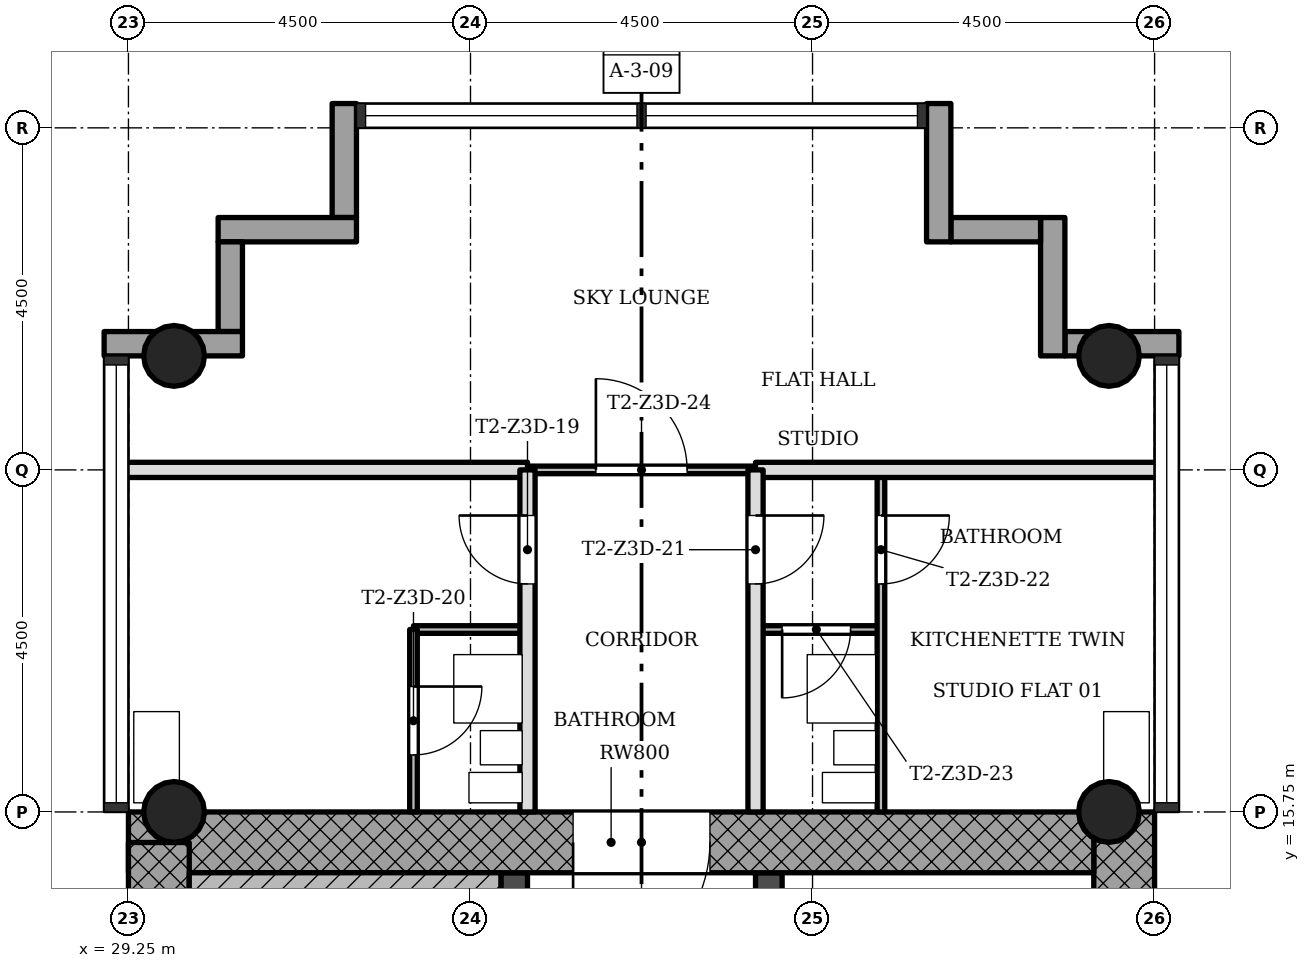
"""IFC4 building model, lengths in metres.
Left out: names, types, materials, properties, quantities, classifications, styles, units other than length and angle.
Written with IfcOpenShell. Run it as: python <this file> out.ifc"""

import sys

from ifc_helpers import new_model, si_unit, direction, frame, frame_2d, origin, origin_2d, place, context, subcontext, project, spatial, rectangle, hollow_circle, extrude, element, fill, save


model = new_model("IFC4")
c1 = context("Model", 3, precision=1e-05, world=origin(), true_north=direction((0.0, 1.0)))
c2 = subcontext(c1, "Body", "Model", "MODEL_VIEW")
j1 = project(units=[si_unit("LENGTHUNIT", "METRE"), si_unit("PLANEANGLEUNIT", "RADIAN")], contexts=[c1])
p1 = place(None, origin())
s1 = spatial("IfcSite", under=j1, at=p1, CompositionType="ELEMENT")
p2 = place(p1, origin())
s2 = spatial("IfcBuilding", under=s1, at=p2, CompositionType="ELEMENT")
p3 = place(p2, frame((0.0, 0.0, 174.5)))
s3 = spatial("IfcBuildingStorey", under=s2, at=p3, CompositionType="ELEMENT", Elevation=174.5)
p4 = place(p3, frame((42.35, 7.55, 0.0), z_axis=(0.0, 0.0, 1.0), x_axis=(0.0, 1.0, 0.0)))
e1 = element("IfcWall", 1, at=p4, inside=s3, PredefinedType="SHEAR", context=c2, shape_type="SweptSolid", body=[
    extrude(rectangle(XDim=8.2, YDim=0.8, at=frame_2d((4.1, 0.0))), origin(), (0.0, 0.0, 1.0), 3.4),
])
p5 = place(p3, frame((41.95, 15.35, 0.0), z_axis=(0.0, 0.0, 1.0), x_axis=(-1.0, 0.0, 0.0)))
e2 = element("IfcWall", 2, at=p5, inside=s3, PredefinedType="SHEAR", context=c2, shape_type="SweptSolid", body=[
    extrude(rectangle(XDim=12.7, YDim=0.8, at=frame_2d((6.35, 0.0))), origin(), (0.0, 0.0, 1.0), 3.4),
])
p6 = place(p5, frame((5.05, 0.0, 0.0)))
e3 = element("IfcOpeningElement", 3, at=p6, cuts=e2, PredefinedType="OPENING", context=c2, shape_type="SweptSolid", body=[
    extrude(rectangle(XDim=1.8, YDim=2.1, at=frame_2d((0.9, 1.05))), frame((0.0, 0.41, 0.0), z_axis=(0.0, -1.0, 0.0), x_axis=(1.0, 0.0, 0.0)), (0.0, 0.0, 1.0), 0.82),
])
p7 = place(p3, frame((29.65, 15.348, 0.0), z_axis=(0.0, 0.0, 1.0), x_axis=(0.0, -1.0, 0.0)))
e4 = element("IfcWall", 4, at=p7, inside=s3, PredefinedType="SHEAR", context=c2, shape_type="SweptSolid", body=[
    extrude(rectangle(XDim=8.796, YDim=0.8, at=frame_2d((4.398, 0.0))), origin(), (0.0, 0.0, 1.0), 3.4),
])
p8 = place(p3, frame((34.325, 7.55, 0.0), z_axis=(0.0, 0.0, 1.0), x_axis=(0.0, 1.0, 0.0)))
e5 = element("IfcWall", 5, at=p8, inside=s3, PredefinedType="SHEAR", context=c2, shape_type="SweptSolid", body=[
    extrude(rectangle(XDim=7.4, YDim=0.35, at=frame_2d((3.7, 0.0))), origin(), (0.0, 0.0, 1.0), 3.4),
])
p9 = place(p8, frame((0.85, 0.0, 0.0)))
e6 = element("IfcOpeningElement", 6, at=p9, cuts=e5, PredefinedType="OPENING", context=c2, shape_type="SweptSolid", body=[
    extrude(rectangle(XDim=0.9, YDim=2.1, at=frame_2d((0.45, 1.05))), frame((0.0, 0.185, 0.0), z_axis=(0.0, -1.0, 0.0), x_axis=(1.0, 0.0, 0.0)), (0.0, 0.0, 1.0), 0.37),
])
p10 = place(p3, frame((37.675, 7.55, 0.0), z_axis=(0.0, 0.0, 1.0), x_axis=(0.0, 1.0, 0.0)))
e7 = element("IfcWall", 7, at=p10, inside=s3, PredefinedType="SHEAR", context=c2, shape_type="SweptSolid", body=[
    extrude(rectangle(XDim=7.4, YDim=0.35, at=frame_2d((3.7, 0.0))), origin(), (0.0, 0.0, 1.0), 3.4),
])
p11 = place(p10, frame((0.95, 0.0, 0.0)))
e8 = element("IfcOpeningElement", 8, at=p11, cuts=e7, PredefinedType="OPENING", context=c2, shape_type="SweptSolid", body=[
    extrude(rectangle(XDim=1.1, YDim=2.1, at=frame_2d((0.55, 1.05))), frame((0.0, 0.185, 0.0), z_axis=(0.0, -1.0, 0.0), x_axis=(1.0, 0.0, 0.0)), (0.0, 0.0, 1.0), 0.37),
])
p12 = place(p10, frame((3.15, 0.0, 0.0)))
e9 = element("IfcOpeningElement", 9, at=p12, cuts=e7, PredefinedType="OPENING", context=c2, shape_type="SweptSolid", body=[
    extrude(rectangle(XDim=1.1, YDim=2.1, at=frame_2d((0.55, 1.05))), frame((0.0, 0.185, 0.0), z_axis=(0.0, -1.0, 0.0), x_axis=(1.0, 0.0, 0.0)), (0.0, 0.0, 1.0), 0.37),
])
p13 = place(p10, frame((5.35, 0.0, 0.0)))
e10 = element("IfcOpeningElement", 10, at=p13, cuts=e7, PredefinedType="OPENING", context=c2, shape_type="SweptSolid", body=[
    extrude(rectangle(XDim=1.1, YDim=2.1, at=frame_2d((0.55, 1.05))), frame((0.0, 0.185, 0.0), z_axis=(0.0, -1.0, 0.0), x_axis=(1.0, 0.0, 0.0)), (0.0, 0.0, 1.0), 0.37),
])
for number, where, z_axis, x_axis in (
    (11, (42.15, 15.75, 0.0), (0.0, 0.0, 1.0), (1.0, 0.0, 0.0)),
    (12, (29.85, 15.75, 0.0), (0.0, 0.0, 1.0), (1.0, 0.0, 0.0)),
    (13, (42.15, 21.75, 0.0), (0.0, 0.0, 1.0), (1.0, 0.0, 0.0)),
    (14, (29.85, 21.75, 0.0), (0.0, 0.0, 1.0), (1.0, 0.0, 0.0)),
):
    element("IfcColumn", number, at=place(p3, frame(where, z_axis=z_axis, x_axis=x_axis)), inside=s3, PredefinedType="COLUMN", context=c2, shape_type="SweptSolid", body=[
        extrude(hollow_circle(Radius=0.4, WallThickness=0.028, at=origin_2d()), origin(), (0.0, 0.0, 1.0), 3.4),
    ])
p14 = place(p3, frame((43.07, 21.91, -0.3), z_axis=(0.0, 0.0, 1.0), x_axis=(-1.0, 0.0, 0.0)))
e15 = element("IfcWall", 15, at=p14, inside=s3, PredefinedType="STANDARD", context=c2, shape_type="SweptSolid", body=[
    extrude(rectangle(XDim=1.5, YDim=0.32, at=frame_2d((0.75, 0.0))), origin(), (0.0, 0.0, 1.0), 3.4),
])
p15 = place(p3, frame((41.41, 21.75, -0.3), z_axis=(0.0, 0.0, 1.0), x_axis=(0.0, 1.0, 0.0)))
e16 = element("IfcWall", 16, at=p15, inside=s3, PredefinedType="STANDARD", context=c2, shape_type="SweptSolid", body=[
    extrude(rectangle(XDim=1.82, YDim=0.32, at=frame_2d((0.91, 0.0))), origin(), (0.0, 0.0, 1.0), 3.4),
])
p16 = place(p3, frame((41.25, 23.41, -0.3), z_axis=(0.0, 0.0, 1.0), x_axis=(-1.0, 0.0, 0.0)))
e17 = element("IfcWall", 17, at=p16, inside=s3, PredefinedType="STANDARD", context=c2, shape_type="SweptSolid", body=[
    extrude(rectangle(XDim=1.18, YDim=0.32, at=frame_2d((0.59, 0.0))), origin(), (0.0, 0.0, 1.0), 3.4),
])
p17 = place(p3, frame((39.91, 23.25, -0.3), z_axis=(0.0, 0.0, 1.0), x_axis=(0.0, 1.0, 0.0)))
e18 = element("IfcWall", 18, at=p17, inside=s3, PredefinedType="STANDARD", context=c2, shape_type="SweptSolid", body=[
    extrude(rectangle(XDim=1.82, YDim=0.32, at=frame_2d((0.91, 0.0))), origin(), (0.0, 0.0, 1.0), 3.4),
])
p18 = place(p3, frame((32.09, 25.07, -0.3), z_axis=(0.0, 0.0, 1.0), x_axis=(0.0, -1.0, 0.0)))
e19 = element("IfcWall", 19, at=p18, inside=s3, PredefinedType="STANDARD", context=c2, shape_type="SweptSolid", body=[
    extrude(rectangle(XDim=1.5, YDim=0.32, at=frame_2d((0.75, 0.0))), origin(), (0.0, 0.0, 1.0), 3.4),
])
p19 = place(p3, frame((32.25, 23.41, -0.3), z_axis=(0.0, 0.0, 1.0), x_axis=(-1.0, 0.0, 0.0)))
e20 = element("IfcWall", 20, at=p19, inside=s3, PredefinedType="STANDARD", context=c2, shape_type="SweptSolid", body=[
    extrude(rectangle(XDim=1.82, YDim=0.32, at=frame_2d((0.91, 0.0))), origin(), (0.0, 0.0, 1.0), 3.4),
])
p20 = place(p3, frame((30.59, 23.25, -0.3), z_axis=(0.0, 0.0, 1.0), x_axis=(0.0, -1.0, 0.0)))
e21 = element("IfcWall", 21, at=p20, inside=s3, PredefinedType="STANDARD", context=c2, shape_type="SweptSolid", body=[
    extrude(rectangle(XDim=1.18, YDim=0.32, at=frame_2d((0.59, 0.0))), origin(), (0.0, 0.0, 1.0), 3.4),
])
p21 = place(p3, frame((30.75, 21.91, -0.3), z_axis=(0.0, 0.0, 1.0), x_axis=(-1.0, 0.0, 0.0)))
e22 = element("IfcWall", 22, at=p21, inside=s3, PredefinedType="STANDARD", context=c2, shape_type="SweptSolid", body=[
    extrude(rectangle(XDim=1.82, YDim=0.32, at=frame_2d((0.91, 0.0))), origin(), (0.0, 0.0, 1.0), 3.4),
])
p22 = place(p3, frame((39.15, 18.15, 0.0), z_axis=(0.0, 0.0, 1.0), x_axis=(-1.0, 0.0, 0.0)))
e23 = element("IfcWall", 23, at=p22, inside=s3, PredefinedType="PARTITIONING", context=c2, shape_type="SweptSolid", body=[
    extrude(rectangle(XDim=1.65, YDim=0.1, at=frame_2d((0.825, 0.0))), origin(), (0.0, 0.0, 1.0), 3.0),
])
p23 = place(p22, frame((0.4, 0.0, 0.0)))
e24 = element("IfcOpeningElement", 24, at=p23, cuts=e23, PredefinedType="OPENING", context=c2, shape_type="SweptSolid", body=[
    extrude(rectangle(XDim=0.9, YDim=2.1, at=frame_2d((0.45, 1.05))), frame((0.0, 0.06, 0.0), z_axis=(0.0, -1.0, 0.0), x_axis=(1.0, 0.0, 0.0)), (0.0, 0.0, 1.0), 0.12),
])
p24 = place(p3, frame((34.5, 18.15, 0.0), z_axis=(0.0, 0.0, 1.0), x_axis=(-1.0, 0.0, 0.0)))
e25 = element("IfcWall", 25, at=p24, inside=s3, PredefinedType="PARTITIONING", context=c2, shape_type="SweptSolid", body=[
    extrude(rectangle(XDim=1.5, YDim=0.1, at=frame_2d((0.75, 0.0))), origin(), (0.0, 0.0, 1.0), 3.0),
])
p25 = place(p3, frame((37.5, 20.25, 0.0), z_axis=(0.0, 0.0, 1.0), x_axis=(-1.0, 0.0, 0.0)))
e26 = element("IfcWall", 26, at=p25, inside=s3, PredefinedType="PARTITIONING", context=c2, shape_type="SweptSolid", body=[
    extrude(rectangle(XDim=3.0, YDim=0.1, at=frame_2d((1.5, 0.0))), origin(), (0.0, 0.0, 1.0), 3.0),
])
p26 = place(p25, frame((0.9, 0.0, 0.0)))
e27 = element("IfcOpeningElement", 27, at=p26, cuts=e26, PredefinedType="OPENING", context=c2, shape_type="SweptSolid", body=[
    extrude(rectangle(XDim=1.2, YDim=2.1, at=frame_2d((0.6, 1.05))), frame((0.0, 0.06, 0.0), z_axis=(0.0, -1.0, 0.0), x_axis=(1.0, 0.0, 0.0)), (0.0, 0.0, 1.0), 0.12),
])
for number, where, z_axis, x_axis in (
    (28, (42.85, 20.25, 0.0), (0.0, 0.0, 1.0), (-1.0, 0.0, 0.0)),
    (29, (34.5, 20.25, 0.0), (0.0, 0.0, 1.0), (-1.0, 0.0, 0.0)),
):
    element("IfcWall", number, at=place(p3, frame(where, z_axis=z_axis, x_axis=x_axis)), inside=s3, PredefinedType="SOLIDWALL", context=c2, shape_type="SweptSolid", body=[
        extrude(rectangle(XDim=5.35, YDim=0.2, at=frame_2d((2.675, 0.0))), origin(), (0.0, 0.0, 1.0), 3.0),
    ])
p27 = place(p3, frame((39.15, 15.75, 0.0), z_axis=(0.0, 0.0, 1.0), x_axis=(0.0, 1.0, 0.0)))
e30 = element("IfcWall", 30, at=p27, inside=s3, PredefinedType="PARTITIONING", context=c2, shape_type="SweptSolid", body=[
    extrude(rectangle(XDim=4.5, YDim=0.1, at=frame_2d((2.25, 0.0))), origin(), (0.0, 0.0, 1.0), 3.0),
])
p28 = place(p27, frame((3.0, 0.0, 0.0)))
e31 = element("IfcOpeningElement", 31, at=p28, cuts=e30, PredefinedType="OPENING", context=c2, shape_type="SweptSolid", body=[
    extrude(rectangle(XDim=0.9, YDim=2.1, at=frame_2d((0.45, 1.05))), frame((0.0, 0.06, 0.0), z_axis=(0.0, -1.0, 0.0), x_axis=(1.0, 0.0, 0.0)), (0.0, 0.0, 1.0), 0.12),
])
p29 = place(p3, frame((37.5, 15.75, 0.0), z_axis=(0.0, 0.0, 1.0), x_axis=(0.0, 1.0, 0.0)))
e32 = element("IfcWall", 32, at=p29, inside=s3, PredefinedType="SOLIDWALL", context=c2, shape_type="SweptSolid", body=[
    extrude(rectangle(XDim=4.5, YDim=0.2, at=frame_2d((2.25, 0.0))), origin(), (0.0, 0.0, 1.0), 3.0),
])
p30 = place(p29, frame((3.0, 0.0, 0.0)))
e33 = element("IfcOpeningElement", 33, at=p30, cuts=e32, PredefinedType="OPENING", context=c2, shape_type="SweptSolid", body=[
    extrude(rectangle(XDim=0.9, YDim=2.1, at=frame_2d((0.45, 1.05))), frame((0.0, 0.11, 0.0), z_axis=(0.0, -1.0, 0.0), x_axis=(1.0, 0.0, 0.0)), (0.0, 0.0, 1.0), 0.22),
])
p31 = place(p3, frame((34.5, 15.75, 0.0), z_axis=(0.0, 0.0, 1.0), x_axis=(0.0, 1.0, 0.0)))
e34 = element("IfcWall", 34, at=p31, inside=s3, PredefinedType="SOLIDWALL", context=c2, shape_type="SweptSolid", body=[
    extrude(rectangle(XDim=4.5, YDim=0.2, at=frame_2d((2.25, 0.0))), origin(), (0.0, 0.0, 1.0), 3.0),
])
p32 = place(p31, frame((3.0, 0.0, 0.0)))
e35 = element("IfcOpeningElement", 35, at=p32, cuts=e34, PredefinedType="OPENING", context=c2, shape_type="SweptSolid", body=[
    extrude(rectangle(XDim=0.9, YDim=2.1, at=frame_2d((0.45, 1.05))), frame((0.0, 0.11, 0.0), z_axis=(0.0, -1.0, 0.0), x_axis=(1.0, 0.0, 0.0)), (0.0, 0.0, 1.0), 0.22),
])
p33 = place(p3, frame((33.0, 15.75, 0.0), z_axis=(0.0, 0.0, 1.0), x_axis=(0.0, 1.0, 0.0)))
e36 = element("IfcWall", 36, at=p33, inside=s3, PredefinedType="PARTITIONING", context=c2, shape_type="SweptSolid", body=[
    extrude(rectangle(XDim=2.4, YDim=0.1, at=frame_2d((1.2, 0.0))), origin(), (0.0, 0.0, 1.0), 3.0),
])
p34 = place(p33, frame((0.75, 0.0, 0.0)))
e37 = element("IfcOpeningElement", 37, at=p34, cuts=e36, PredefinedType="OPENING", context=c2, shape_type="SweptSolid", body=[
    extrude(rectangle(XDim=0.9, YDim=2.1, at=frame_2d((0.45, 1.05))), frame((0.0, 0.06, 0.0), z_axis=(0.0, -1.0, 0.0), x_axis=(1.0, 0.0, 0.0)), (0.0, 0.0, 1.0), 0.12),
])
p35 = place(p3, frame((34.15, 14.75, 0.0), z_axis=(0.0, 0.0, 1.0), x_axis=(-1.0, 0.0, 0.0)))
e38 = element("IfcWall", 38, at=p35, inside=s3, PredefinedType="SHEAR", context=c2, shape_type="SweptSolid", body=[
    extrude(rectangle(XDim=4.1, YDim=0.4, at=frame_2d((2.05, 0.0))), origin(), (0.0, 0.0, 1.0), 3.4),
])
p36 = place(p32, origin())
e39 = element("IfcDoor", 39, at=p36, inside=s3, OperationType="SINGLE_SWING_LEFT", PredefinedType="DOOR", context=c2, shape_type="SweptSolid", body=[
    extrude(rectangle(XDim=0.9, YDim=2.1, at=frame_2d((0.45, 1.05))), frame((0.0, 0.025, 0.0), z_axis=(0.0, -1.0, 0.0), x_axis=(1.0, 0.0, 0.0)), (0.0, 0.0, 1.0), 0.05),
])
fill(e35, e39)
p37 = place(p34, origin())
e40 = element("IfcDoor", 40, at=p37, inside=s3, OperationType="SINGLE_SWING_RIGHT", PredefinedType="DOOR", context=c2, shape_type="SweptSolid", body=[
    extrude(rectangle(XDim=0.9, YDim=2.1, at=frame_2d((0.45, 1.05))), frame((0.0, 0.025, 0.0), z_axis=(0.0, -1.0, 0.0), x_axis=(1.0, 0.0, 0.0)), (0.0, 0.0, 1.0), 0.05),
])
fill(e37, e40)
p38 = place(p30, origin())
e41 = element("IfcDoor", 41, at=p38, inside=s3, OperationType="SINGLE_SWING_RIGHT", PredefinedType="DOOR", context=c2, shape_type="SweptSolid", body=[
    extrude(rectangle(XDim=0.9, YDim=2.1, at=frame_2d((0.45, 1.05))), frame((0.0, 0.025, 0.0), z_axis=(0.0, -1.0, 0.0), x_axis=(1.0, 0.0, 0.0)), (0.0, 0.0, 1.0), 0.05),
])
fill(e33, e41)
p39 = place(p28, origin())
e42 = element("IfcDoor", 42, at=p39, inside=s3, OperationType="SINGLE_SWING_RIGHT", PredefinedType="DOOR", context=c2, shape_type="SweptSolid", body=[
    extrude(rectangle(XDim=0.9, YDim=2.1, at=frame_2d((0.45, 1.05))), frame((0.0, 0.025, 0.0), z_axis=(0.0, -1.0, 0.0), x_axis=(1.0, 0.0, 0.0)), (0.0, 0.0, 1.0), 0.05),
])
fill(e31, e42)
p40 = place(p23, origin())
e43 = element("IfcDoor", 43, at=p40, inside=s3, OperationType="SINGLE_SWING_LEFT", PredefinedType="DOOR", context=c2, shape_type="SweptSolid", body=[
    extrude(rectangle(XDim=0.9, YDim=2.1, at=frame_2d((0.45, 1.05))), frame((0.0, 0.025, 0.0), z_axis=(0.0, -1.0, 0.0), x_axis=(1.0, 0.0, 0.0)), (0.0, 0.0, 1.0), 0.05),
])
fill(e24, e43)
p41 = place(p26, origin())
e44 = element("IfcDoor", 44, at=p41, inside=s3, OperationType="SINGLE_SWING_RIGHT", PredefinedType="DOOR", context=c2, shape_type="SweptSolid", body=[
    extrude(rectangle(XDim=1.2, YDim=2.1, at=frame_2d((0.6, 1.05))), frame((0.0, 0.025, 0.0), z_axis=(0.0, -1.0, 0.0), x_axis=(1.0, 0.0, 0.0)), (0.0, 0.0, 1.0), 0.05),
])
fill(e27, e44)
p42 = place(p6, origin())
e45 = element("IfcDoor", 45, at=p42, inside=s3, OperationType="SINGLE_SWING_LEFT", PredefinedType="DOOR", context=c2, shape_type="SweptSolid", body=[
    extrude(rectangle(XDim=1.8, YDim=2.1, at=frame_2d((0.9, 1.05))), frame((0.0, 0.025, 0.0), z_axis=(0.0, -1.0, 0.0), x_axis=(1.0, 0.0, 0.0)), (0.0, 0.0, 1.0), 0.05),
])
fill(e3, e45)
save(model, sys.argv[1])
